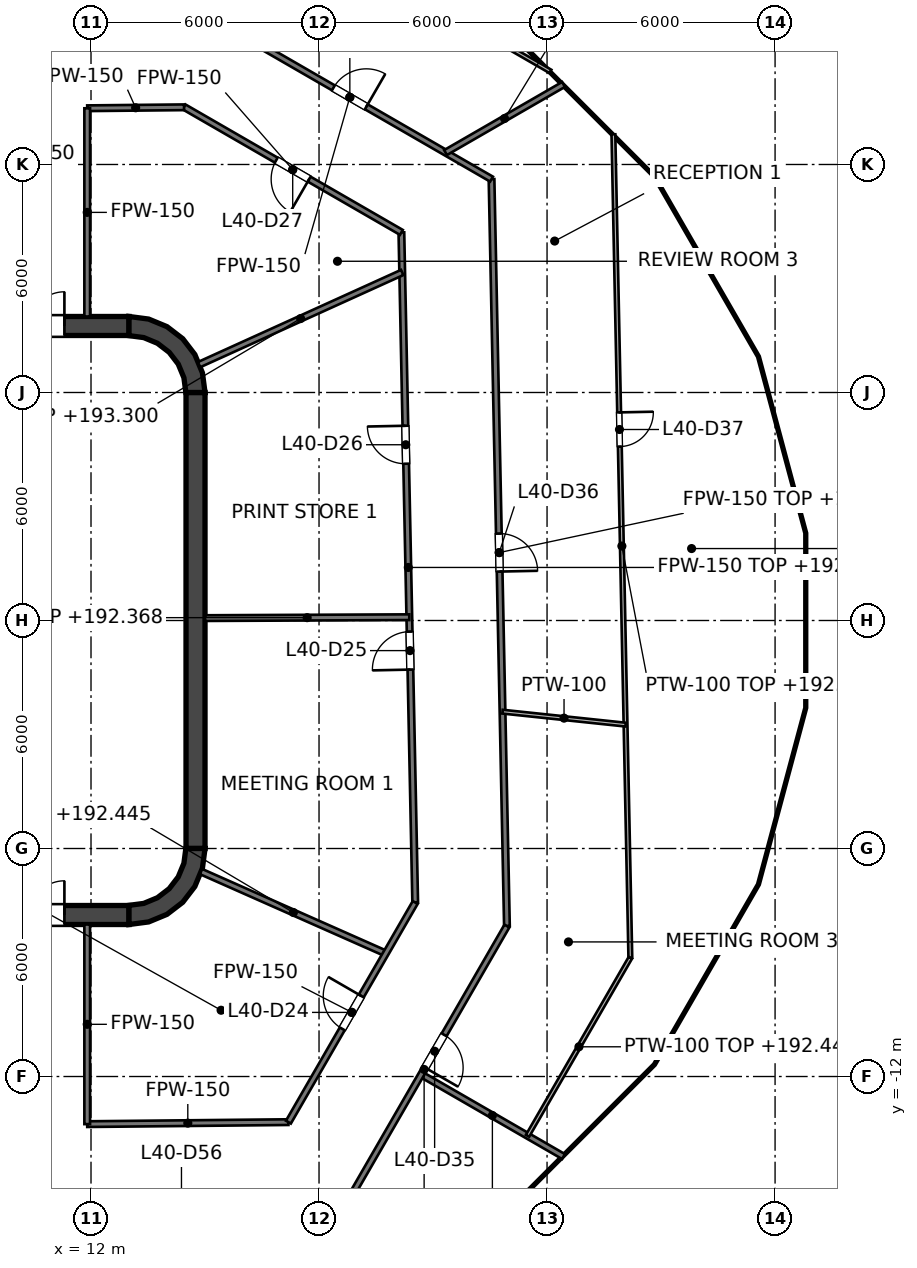
"""IFC4 building model, lengths in metres.
Left out: names, types, materials, properties, quantities, classifications, styles, units other than length and angle.
Written with IfcOpenShell. Run it as: python <this file> out.ifc"""

import sys

from ifc_helpers import new_model, si_unit, direction, frame, frame_2d, origin, place, context, subcontext, project, spatial, polyline, rectangle, outline, extrude, element, fill, save


model = new_model("IFC4")
c1 = context("Model", 3, precision=1e-05, world=origin(), true_north=direction((0.0, 1.0)))
c2 = subcontext(c1, "Body", "Model", "MODEL_VIEW")
j1 = project(units=[si_unit("LENGTHUNIT", "METRE"), si_unit("PLANEANGLEUNIT", "RADIAN")], contexts=[c1])
p1 = place(None, origin())
s1 = spatial("IfcSite", under=j1, at=p1, CompositionType="ELEMENT")
p2 = place(p1, origin())
s2 = spatial("IfcBuilding", under=s1, at=p2, CompositionType="ELEMENT")
p3 = place(p2, frame((0.0, 0.0, 189.6)))
s3 = spatial("IfcBuildingStorey", under=s2, at=p3, CompositionType="ELEMENT", Elevation=189.6)
p4 = place(p3, frame((-13.0, 7.75, 0.0), z_axis=(0.0, 0.0, 1.0), x_axis=(1.0, 0.0, 0.0)))
e1 = element("IfcWall", 1, at=p4, inside=s3, PredefinedType="SHEAR", context=c2, shape_type="SweptSolid", body=[
    extrude(rectangle(XDim=26.0, YDim=0.5, at=frame_2d((13.0, 0.0))), origin(), (0.0, 0.0, 1.0), 4.0),
])
p5 = place(p4, frame((1.7, 0.0, 0.0)))
e2 = element("IfcOpeningElement", 2, at=p5, cuts=e1, PredefinedType="OPENING", context=c2, shape_type="SweptSolid", body=[
    extrude(rectangle(XDim=1.8, YDim=2.1, at=frame_2d((0.9, 1.05))), frame((0.0, 0.25, 0.0), z_axis=(0.0, -1.0, 0.0), x_axis=(1.0, 0.0, 0.0)), (0.0, 0.0, 1.0), 0.5),
])
p6 = place(p4, frame((22.5, 0.0, 0.0)))
e3 = element("IfcOpeningElement", 3, at=p6, cuts=e1, PredefinedType="OPENING", context=c2, shape_type="SweptSolid", body=[
    extrude(rectangle(XDim=1.8, YDim=2.1, at=frame_2d((0.9, 1.05))), frame((0.0, 0.25, 0.0), z_axis=(0.0, -1.0, 0.0), x_axis=(1.0, 0.0, 0.0)), (0.0, 0.0, 1.0), 0.5),
])
p7 = place(p3, frame((-13.0, -7.75, 0.0), z_axis=(0.0, 0.0, 1.0), x_axis=(1.0, 0.0, 0.0)))
e4 = element("IfcWall", 4, at=p7, inside=s3, PredefinedType="SHEAR", context=c2, shape_type="SweptSolid", body=[
    extrude(rectangle(XDim=26.0, YDim=0.5, at=frame_2d((13.0, 0.0))), origin(), (0.0, 0.0, 1.0), 4.0),
])
p8 = place(p7, frame((1.7, 0.0, 0.0)))
e5 = element("IfcOpeningElement", 5, at=p8, cuts=e4, PredefinedType="OPENING", context=c2, shape_type="SweptSolid", body=[
    extrude(rectangle(XDim=1.8, YDim=2.1, at=frame_2d((0.9, 1.05))), frame((0.0, 0.25, 0.0), z_axis=(0.0, -1.0, 0.0), x_axis=(1.0, 0.0, 0.0)), (0.0, 0.0, 1.0), 0.5),
])
p9 = place(p7, frame((22.5, 0.0, 0.0)))
e6 = element("IfcOpeningElement", 6, at=p9, cuts=e4, PredefinedType="OPENING", context=c2, shape_type="SweptSolid", body=[
    extrude(rectangle(XDim=1.8, YDim=2.1, at=frame_2d((0.9, 1.05))), frame((0.0, 0.25, 0.0), z_axis=(0.0, -1.0, 0.0), x_axis=(1.0, 0.0, 0.0)), (0.0, 0.0, 1.0), 0.5),
])
p10 = place(p3, frame((14.75, -6.0, 0.0), z_axis=(0.0, 0.0, 1.0), x_axis=(0.0, 1.0, 0.0)))
e7 = element("IfcWall", 7, at=p10, inside=s3, PredefinedType="SHEAR", context=c2, shape_type="SweptSolid", body=[
    extrude(rectangle(XDim=12.0, YDim=0.5, at=frame_2d((6.0, 0.0))), origin(), (0.0, 0.0, 1.0), 4.0),
])
p11 = place(p3, origin())
e8 = element("IfcWall", 8, at=p11, inside=s3, PredefinedType="SHEAR", context=c2, shape_type="SweptSolid", body=[
    extrude(outline(polyline([(13.0, 8.0), (13.0, 7.496), (13.387, 7.445), (13.748, 7.295), (14.058, 7.058), (14.295, 6.748), (14.445, 6.387), (14.496, 6.0), (15.0, 6.0), (14.932, 6.518), (14.732, 7.0), (14.414, 7.414), (14.0, 7.732), (13.518, 7.932), (13.0, 8.0)])), origin(), (0.0, 0.0, 1.0), 4.0),
])
e9 = element("IfcWall", 9, at=p11, inside=s3, PredefinedType="SHEAR", context=c2, shape_type="SweptSolid", body=[
    extrude(outline(polyline([(15.0, -6.0), (14.496, -6.0), (14.445, -6.387), (14.295, -6.748), (14.058, -7.058), (13.748, -7.295), (13.387, -7.445), (13.0, -7.496), (13.0, -8.0), (13.518, -7.932), (14.0, -7.732), (14.414, -7.414), (14.732, -7.0), (14.932, -6.518), (15.0, -6.0)])), origin(), (0.0, 0.0, 1.0), 4.0),
])
p12 = place(p3, frame((11.8, -7.5, 0.0), z_axis=(0.0, 0.0, 1.0), x_axis=(0.0, 1.0, 0.0)))
e10 = element("IfcWall", 10, at=p12, inside=s3, PredefinedType="SOLIDWALL", context=c2, shape_type="SweptSolid", body=[
    extrude(rectangle(XDim=15.0, YDim=0.4, at=frame_2d((7.5, 0.0))), origin(), (0.0, 0.0, 1.0), 3.85),
])
p13 = place(p12, frame((11.3, 0.0, 0.0)))
e11 = element("IfcOpeningElement", 11, at=p13, cuts=e10, PredefinedType="OPENING", context=c2, shape_type="SweptSolid", body=[
    extrude(rectangle(XDim=1.1, YDim=2.1, at=frame_2d((0.55, 1.05))), frame((0.0, 0.2, 0.0), z_axis=(0.0, -1.0, 0.0), x_axis=(1.0, 0.0, 0.0)), (0.0, 0.0, 1.0), 0.4),
])
p14 = place(p12, frame((8.4, 0.0, 0.0)))
e12 = element("IfcOpeningElement", 12, at=p14, cuts=e10, PredefinedType="OPENING", context=c2, shape_type="SweptSolid", body=[
    extrude(rectangle(XDim=1.1, YDim=2.1, at=frame_2d((0.55, 1.05))), frame((0.0, 0.2, 0.0), z_axis=(0.0, -1.0, 0.0), x_axis=(1.0, 0.0, 0.0)), (0.0, 0.0, 1.0), 0.4),
])
p15 = place(p12, frame((5.5, 0.0, 0.0)))
e13 = element("IfcOpeningElement", 13, at=p15, cuts=e10, PredefinedType="OPENING", context=c2, shape_type="SweptSolid", body=[
    extrude(rectangle(XDim=1.1, YDim=2.1, at=frame_2d((0.55, 1.05))), frame((0.0, 0.2, 0.0), z_axis=(0.0, -1.0, 0.0), x_axis=(1.0, 0.0, 0.0)), (0.0, 0.0, 1.0), 0.4),
])
p16 = place(p12, frame((13.697, 0.0, 0.0)))
e14 = element("IfcOpeningElement", 14, at=p16, cuts=e10, PredefinedType="OPENING", context=c2, shape_type="SweptSolid", body=[
    extrude(rectangle(XDim=0.9, YDim=2.1, at=frame_2d((0.45, 1.05))), frame((0.0, 0.2, 0.0), z_axis=(0.0, -1.0, 0.0), x_axis=(1.0, 0.0, 0.0)), (0.0, 0.0, 1.0), 0.4),
])
p17 = place(p12, frame((0.403, 0.0, 0.0)))
e15 = element("IfcOpeningElement", 15, at=p17, cuts=e10, PredefinedType="OPENING", context=c2, shape_type="SweptSolid", body=[
    extrude(rectangle(XDim=0.9, YDim=2.1, at=frame_2d((0.45, 1.05))), frame((0.0, 0.2, 0.0), z_axis=(0.0, -1.0, 0.0), x_axis=(1.0, 0.0, 0.0)), (0.0, 0.0, 1.0), 0.4),
])
e16 = element("IfcWall", 16, at=p11, inside=s3, PredefinedType="SOLIDWALL", context=c2, shape_type="SweptSolid", body=[
    extrude(outline(polyline([(12.0, -5.675), (12.0, -5.925), (14.25, -5.925), (14.5, -5.925), (14.5, -5.675), (14.5, -3.025), (14.5, -2.775), (14.5, -0.125), (14.5, 0.125), (14.5, 2.775), (14.5, 3.025), (14.5, 5.675), (14.5, 5.925), (14.25, 5.925), (12.0, 5.925), (12.0, 5.675), (14.25, 5.675), (14.25, 3.025), (12.0, 3.025), (12.0, 2.775), (14.25, 2.775), (14.25, 0.125), (12.0, 0.125), (12.0, -0.125), (14.25, -0.125), (14.25, -2.775), (12.0, -2.775), (12.0, -3.025), (14.25, -3.025), (14.25, -5.675), (12.0, -5.675)])), origin(), (0.0, 0.0, 1.0), 3.85),
])
p18 = place(p3, frame((20.167, 10.213, 0.0), z_axis=(0.0, 0.0, 1.0), x_axis=(0.020624730832, -0.999787287616, 0.0)))
e17 = element("IfcWall", 17, at=p18, inside=s3, PredefinedType="PARTITIONING", context=c2, shape_type="SweptSolid", body=[
    extrude(rectangle(XDim=17.637, YDim=0.15, at=frame_2d((8.819, 0.0))), origin(), (0.0, 0.0, 1.0), 2.768),
])
p19 = place(p18, frame((10.508, 0.0, 0.0)))
e18 = element("IfcOpeningElement", 18, at=p19, cuts=e17, PredefinedType="OPENING", context=c2, shape_type="SweptSolid", body=[
    extrude(rectangle(XDim=1.0, YDim=2.1, at=frame_2d((0.5, 1.05))), frame((0.0, 0.075, 0.0), z_axis=(0.0, -1.0, 0.0), x_axis=(1.0, 0.0, 0.0)), (0.0, 0.0, 1.0), 0.15),
])
p20 = place(p18, frame((5.089, 0.0, 0.0)))
e19 = element("IfcOpeningElement", 19, at=p20, cuts=e17, PredefinedType="OPENING", context=c2, shape_type="SweptSolid", body=[
    extrude(rectangle(XDim=1.0, YDim=2.1, at=frame_2d((0.5, 1.05))), frame((0.0, 0.075, 0.0), z_axis=(0.0, -1.0, 0.0), x_axis=(1.0, 0.0, 0.0)), (0.0, 0.0, 1.0), 0.15),
])
p21 = place(p3, frame((22.539, 11.615, 0.0), z_axis=(0.0, 0.0, 1.0), x_axis=(0.020626332176, -0.99978725458, 0.0)))
e20 = element("IfcWall", 20, at=p21, inside=s3, PredefinedType="PARTITIONING", context=c2, shape_type="SweptSolid", body=[
    extrude(rectangle(XDim=19.66, YDim=0.15, at=frame_2d((9.83, 0.0))), origin(), (0.0, 0.0, 1.0), 2.768),
])
p22 = place(p21, frame((9.33, 0.0, 0.0)))
e21 = element("IfcOpeningElement", 21, at=p22, cuts=e20, PredefinedType="OPENING", context=c2, shape_type="SweptSolid", body=[
    extrude(rectangle(XDim=1.0, YDim=2.1, at=frame_2d((0.5, 1.05))), frame((0.0, 0.075, 0.0), z_axis=(0.0, -1.0, 0.0), x_axis=(1.0, 0.0, 0.0)), (0.0, 0.0, 1.0), 0.15),
])
p23 = place(p3, frame((20.69, -11.945, 0.0), z_axis=(0.0, 0.0, 1.0), x_axis=(0.866048255864, -0.499960416948, 0.0)))
e22 = element("IfcWall", 22, at=p23, inside=s3, PredefinedType="PARTITIONING", context=c2, shape_type="SweptSolid", body=[
    extrude(rectangle(XDim=4.322, YDim=0.15, at=frame_2d((2.161, 0.0))), origin(), (0.0, 0.0, 1.0), 2.845),
])
p24 = place(p3, frame((14.448, 13.515, 0.0), z_axis=(0.0, 0.0, 1.0), x_axis=(0.866032288321, -0.499988075443, 0.0)))
e23 = element("IfcWall", 23, at=p24, inside=s3, PredefinedType="PARTITIONING", context=c2, shape_type="SweptSolid", body=[
    extrude(rectangle(XDim=6.604, YDim=0.15, at=frame_2d((3.302, 0.0))), origin(), (0.0, 0.0, 1.0), 2.777),
])
p25 = place(p24, frame((2.802, 0.0, 0.0)))
e24 = element("IfcOpeningElement", 24, at=p25, cuts=e23, PredefinedType="OPENING", context=c2, shape_type="SweptSolid", body=[
    extrude(rectangle(XDim=1.0, YDim=2.1, at=frame_2d((0.5, 1.05))), frame((0.0, 0.075, 0.0), z_axis=(0.0, -1.0, 0.0), x_axis=(1.0, 0.0, 0.0)), (0.0, 0.0, 1.0), 0.15),
])
p26 = place(p3, frame((15.08, 15.921, 0.0), z_axis=(0.0, 0.0, 1.0), x_axis=(0.866020838546, -0.500007907142, 0.0)))
e25 = element("IfcWall", 25, at=p26, inside=s3, PredefinedType="PARTITIONING", context=c2, shape_type="SweptSolid", body=[
    extrude(rectangle(XDim=8.613, YDim=0.15, at=frame_2d((4.306, 0.0))), origin(), (0.0, 0.0, 1.0), 2.777),
])
p27 = place(p26, frame((3.808, 0.0, 0.0)))
e26 = element("IfcOpeningElement", 26, at=p27, cuts=e25, PredefinedType="OPENING", context=c2, shape_type="SweptSolid", body=[
    extrude(rectangle(XDim=1.0, YDim=2.1, at=frame_2d((0.5, 1.05))), frame((0.0, 0.075, 0.0), z_axis=(0.0, -1.0, 0.0), x_axis=(1.0, 0.0, 0.0)), (0.0, 0.0, 1.0), 0.15),
])
p28 = place(p3, frame((14.895, -6.607, 0.0), z_axis=(0.0, 0.0, 1.0), x_axis=(0.914233271379, -0.405188259337, 0.0)))
e27 = element("IfcWall", 27, at=p28, inside=s3, PredefinedType="PARTITIONING", context=c2, shape_type="SweptSolid", body=[
    extrude(rectangle(XDim=5.317, YDim=0.15, at=frame_2d((2.659, 0.0))), origin(), (0.0, 0.0, 1.0), 2.845),
])
p29 = place(p3, frame((15.0, 0.063, 0.0), z_axis=(0.0, 0.0, 1.0), x_axis=(0.999990294223, 0.004405843865, 0.0)))
e28 = element("IfcWall", 28, at=p29, inside=s3, PredefinedType="PARTITIONING", context=c2, shape_type="SweptSolid", body=[
    extrude(rectangle(XDim=5.375, YDim=0.15, at=frame_2d((2.688, 0.0))), origin(), (0.0, 0.0, 1.0), 2.768),
])
p30 = place(p3, frame((11.9, -13.253, 0.0), z_axis=(0.0, 0.0, 1.0), x_axis=(0.999951309192, 0.009868092237, 0.0)))
e29 = element("IfcWall", 29, at=p30, inside=s3, PredefinedType="PARTITIONING", context=c2, shape_type="SweptSolid", body=[
    extrude(rectangle(XDim=5.294, YDim=0.15, at=frame_2d((2.647, 0.0))), origin(), (0.0, 0.0, 1.0), 2.777),
])
p31 = place(p3, frame((11.9, 13.48, 0.0), z_axis=(0.0, 0.0, 1.0), x_axis=(0.999951307579, 0.009868255694, 0.0)))
e30 = element("IfcWall", 30, at=p31, inside=s3, PredefinedType="PARTITIONING", context=c2, shape_type="SweptSolid", body=[
    extrude(rectangle(XDim=2.548, YDim=0.15, at=frame_2d((1.274, 0.0))), origin(), (0.0, 0.0, 1.0), 2.777),
])
p32 = place(p3, frame((14.843, 6.733, 0.0), z_axis=(0.0, 0.0, 1.0), x_axis=(0.910628361306, 0.413226315214, 0.0)))
e31 = element("IfcWall", 31, at=p32, inside=s3, PredefinedType="PARTITIONING", context=c2, shape_type="SweptSolid", body=[
    extrude(rectangle(XDim=5.87, YDim=0.15, at=frame_2d((2.935, 0.0))), origin(), (0.0, 0.0, 1.0), 3.7),
])
p33 = place(p3, frame((21.329, 12.314, 0.0), z_axis=(0.0, 0.0, 1.0), x_axis=(0.866038125567, 0.499977964579, 0.0)))
e32 = element("IfcWall", 32, at=p33, inside=s3, PredefinedType="PARTITIONING", context=c2, shape_type="SweptSolid", body=[
    extrude(rectangle(XDim=3.584, YDim=0.15, at=frame_2d((1.792, 0.0))), origin(), (0.0, 0.0, 1.0), 2.845),
])
p34 = place(p3, frame((18.587, -15.587, 0.0), z_axis=(0.0, 0.0, 1.0), x_axis=(0.499960140076, 0.866048415699, 0.0)))
e33 = element("IfcWall", 33, at=p34, inside=s3, PredefinedType="PARTITIONING", context=c2, shape_type="SweptSolid", body=[
    extrude(rectangle(XDim=8.714, YDim=0.15, at=frame_2d((4.357, 0.0))), origin(), (0.0, 0.0, 1.0), 2.777),
])
p35 = place(p34, frame((4.41, 0.0, 0.0)))
e34 = element("IfcOpeningElement", 34, at=p35, cuts=e33, PredefinedType="OPENING", context=c2, shape_type="SweptSolid", body=[
    extrude(rectangle(XDim=1.0, YDim=2.1, at=frame_2d((0.5, 1.05))), frame((0.0, 0.075, 0.0), z_axis=(0.0, -1.0, 0.0), x_axis=(1.0, 0.0, 0.0)), (0.0, 0.0, 1.0), 0.15),
])
p36 = place(p3, frame((17.194, -13.201, 0.0), z_axis=(0.0, 0.0, 1.0), x_axis=(0.499955744085, 0.866050953441, 0.0)))
e35 = element("IfcWall", 35, at=p36, inside=s3, PredefinedType="PARTITIONING", context=c2, shape_type="SweptSolid", body=[
    extrude(rectangle(XDim=6.673, YDim=0.15, at=frame_2d((3.337, 0.0))), origin(), (0.0, 0.0, 1.0), 2.777),
])
p37 = place(p36, frame((2.835, 0.0, 0.0)))
e36 = element("IfcOpeningElement", 36, at=p37, cuts=e35, PredefinedType="OPENING", context=c2, shape_type="SweptSolid", body=[
    extrude(rectangle(XDim=1.0, YDim=2.1, at=frame_2d((0.5, 1.05))), frame((0.0, 0.075, 0.0), z_axis=(0.0, -1.0, 0.0), x_axis=(1.0, 0.0, 0.0)), (0.0, 0.0, 1.0), 0.15),
])
p38 = place(p3, frame((11.9, -13.253, 0.0), z_axis=(0.0, 0.0, 1.0), x_axis=(0.0, 1.0, 0.0)))
e37 = element("IfcWall", 37, at=p38, inside=s3, PredefinedType="PARTITIONING", context=c2, shape_type="SweptSolid", body=[
    extrude(rectangle(XDim=5.253, YDim=0.15, at=frame_2d((2.626, 0.0))), origin(), (0.0, 0.0, 1.0), 2.777),
])
p39 = place(p3, frame((11.9, 8.0, 0.0), z_axis=(0.0, 0.0, 1.0), x_axis=(0.0, 1.0, 0.0)))
e38 = element("IfcWall", 38, at=p39, inside=s3, PredefinedType="PARTITIONING", context=c2, shape_type="SweptSolid", body=[
    extrude(rectangle(XDim=5.479, YDim=0.15, at=frame_2d((2.74, 0.0))), origin(), (0.0, 0.0, 1.0), 2.777),
])
p40 = place(p3, frame((25.746, 12.794, 0.0), z_axis=(0.0, 0.0, 1.0), x_axis=(0.020556718749, -0.999788688331, 0.0)))
e39 = element("IfcWall", 39, at=p40, inside=s3, PredefinedType="PARTITIONING", context=c2, shape_type="SweptSolid", body=[
    extrude(rectangle(XDim=21.675, YDim=0.1, at=frame_2d((10.837, 0.0))), origin(), (0.0, 0.0, 1.0), 2.768),
])
p41 = place(p40, frame((7.32, 0.0, 0.0)))
e40 = element("IfcOpeningElement", 40, at=p41, cuts=e39, PredefinedType="OPENING", context=c2, shape_type="SweptSolid", body=[
    extrude(rectangle(XDim=0.9, YDim=2.1, at=frame_2d((0.45, 1.05))), frame((0.0, 0.05, 0.0), z_axis=(0.0, -1.0, 0.0), x_axis=(1.0, 0.0, 0.0)), (0.0, 0.0, 1.0), 0.1),
])
p42 = place(p3, frame((15.931, 19.16, 0.0), z_axis=(0.0, 0.0, 1.0), x_axis=(0.86598056092, -0.500077662076, 0.0)))
e41 = element("IfcWall", 41, at=p42, inside=s3, PredefinedType="PARTITIONING", context=c2, shape_type="SweptSolid", body=[
    extrude(rectangle(XDim=9.42, YDim=0.1, at=frame_2d((4.71, 0.0))), origin(), (0.0, 0.0, 1.0), 2.777),
])
p43 = place(p3, frame((22.828, -2.399, 0.0), z_axis=(0.0, 0.0, 1.0), x_axis=(0.994498465997, -0.104751139033, 0.0)))
e42 = element("IfcWall", 42, at=p43, inside=s3, PredefinedType="PARTITIONING", context=c2, shape_type="SweptSolid", body=[
    extrude(rectangle(XDim=3.256, YDim=0.1, at=frame_2d((1.628, 0.0))), origin(), (0.0, 0.0, 1.0), 3.7),
])
p44 = place(p3, frame((23.487, -13.56, 0.0), z_axis=(0.0, 0.0, 1.0), x_axis=(0.500066272392, 0.86598713802, 0.0)))
e43 = element("IfcWall", 43, at=p44, inside=s3, PredefinedType="PARTITIONING", context=c2, shape_type="SweptSolid", body=[
    extrude(rectangle(XDim=5.409, YDim=0.1, at=frame_2d((2.705, 0.0))), origin(), (0.0, 0.0, 1.0), 2.845),
])
p45 = place(p13, origin())
e44 = element("IfcDoor", 44, at=p45, inside=s3, OperationType="DOUBLE_DOOR_SLIDING", PredefinedType="DOOR", context=c2, shape_type="SweptSolid", body=[
    extrude(rectangle(XDim=1.1, YDim=2.1, at=frame_2d((0.55, 1.05))), frame((0.0, 0.025, 0.0), z_axis=(0.0, -1.0, 0.0), x_axis=(1.0, 0.0, 0.0)), (0.0, 0.0, 1.0), 0.05),
])
fill(e11, e44)
p46 = place(p14, origin())
e45 = element("IfcDoor", 45, at=p46, inside=s3, OperationType="DOUBLE_DOOR_SLIDING", PredefinedType="DOOR", context=c2, shape_type="SweptSolid", body=[
    extrude(rectangle(XDim=1.1, YDim=2.1, at=frame_2d((0.55, 1.05))), frame((0.0, 0.025, 0.0), z_axis=(0.0, -1.0, 0.0), x_axis=(1.0, 0.0, 0.0)), (0.0, 0.0, 1.0), 0.05),
])
fill(e12, e45)
p47 = place(p15, origin())
e46 = element("IfcDoor", 46, at=p47, inside=s3, OperationType="DOUBLE_DOOR_SLIDING", PredefinedType="DOOR", context=c2, shape_type="SweptSolid", body=[
    extrude(rectangle(XDim=1.1, YDim=2.1, at=frame_2d((0.55, 1.05))), frame((0.0, 0.025, 0.0), z_axis=(0.0, -1.0, 0.0), x_axis=(1.0, 0.0, 0.0)), (0.0, 0.0, 1.0), 0.05),
])
fill(e13, e46)
p48 = place(p16, origin())
e47 = element("IfcDoor", 47, at=p48, inside=s3, OperationType="SINGLE_SWING_RIGHT", PredefinedType="DOOR", context=c2, shape_type="SweptSolid", body=[
    extrude(rectangle(XDim=0.9, YDim=2.1, at=frame_2d((0.45, 1.05))), frame((0.0, 0.025, 0.0), z_axis=(0.0, -1.0, 0.0), x_axis=(1.0, 0.0, 0.0)), (0.0, 0.0, 1.0), 0.05),
])
fill(e14, e47)
p49 = place(p17, origin())
e48 = element("IfcDoor", 48, at=p49, inside=s3, OperationType="SINGLE_SWING_RIGHT", PredefinedType="DOOR", context=c2, shape_type="SweptSolid", body=[
    extrude(rectangle(XDim=0.9, YDim=2.1, at=frame_2d((0.45, 1.05))), frame((0.0, 0.025, 0.0), z_axis=(0.0, -1.0, 0.0), x_axis=(1.0, 0.0, 0.0)), (0.0, 0.0, 1.0), 0.05),
])
fill(e15, e48)
p50 = place(p6, origin())
e49 = element("IfcDoor", 49, at=p50, inside=s3, OperationType="DOUBLE_DOOR_SINGLE_SWING", PredefinedType="DOOR", context=c2, shape_type="SweptSolid", body=[
    extrude(rectangle(XDim=1.8, YDim=2.1, at=frame_2d((0.9, 1.05))), frame((0.0, 0.025, 0.0), z_axis=(0.0, -1.0, 0.0), x_axis=(1.0, 0.0, 0.0)), (0.0, 0.0, 1.0), 0.05),
])
fill(e3, e49)
p51 = place(p9, origin())
e50 = element("IfcDoor", 50, at=p51, inside=s3, OperationType="DOUBLE_DOOR_SINGLE_SWING", PredefinedType="DOOR", context=c2, shape_type="SweptSolid", body=[
    extrude(rectangle(XDim=1.8, YDim=2.1, at=frame_2d((0.9, 1.05))), frame((0.0, 0.025, 0.0), z_axis=(0.0, -1.0, 0.0), x_axis=(1.0, 0.0, 0.0)), (0.0, 0.0, 1.0), 0.05),
])
fill(e6, e50)
p52 = place(p37, origin())
e51 = element("IfcDoor", 51, at=p52, inside=s3, OperationType="SINGLE_SWING_RIGHT", PredefinedType="DOOR", context=c2, shape_type="SweptSolid", body=[
    extrude(rectangle(XDim=1.0, YDim=2.1, at=frame_2d((0.5, 1.05))), frame((0.0, 0.025, 0.0), z_axis=(0.0, -1.0, 0.0), x_axis=(1.0, 0.0, 0.0)), (0.0, 0.0, 1.0), 0.05),
])
fill(e36, e51)
p53 = place(p19, origin())
e52 = element("IfcDoor", 52, at=p53, inside=s3, OperationType="SINGLE_SWING_RIGHT", PredefinedType="DOOR", context=c2, shape_type="SweptSolid", body=[
    extrude(rectangle(XDim=1.0, YDim=2.1, at=frame_2d((0.5, 1.05))), frame((0.0, 0.025, 0.0), z_axis=(0.0, -1.0, 0.0), x_axis=(1.0, 0.0, 0.0)), (0.0, 0.0, 1.0), 0.05),
])
fill(e18, e52)
p54 = place(p20, origin())
e53 = element("IfcDoor", 53, at=p54, inside=s3, OperationType="SINGLE_SWING_LEFT", PredefinedType="DOOR", context=c2, shape_type="SweptSolid", body=[
    extrude(rectangle(XDim=1.0, YDim=2.1, at=frame_2d((0.5, 1.05))), frame((0.0, 0.025, 0.0), z_axis=(0.0, -1.0, 0.0), x_axis=(1.0, 0.0, 0.0)), (0.0, 0.0, 1.0), 0.05),
])
fill(e19, e53)
p55 = place(p25, origin())
e54 = element("IfcDoor", 54, at=p55, inside=s3, OperationType="SINGLE_SWING_RIGHT", PredefinedType="DOOR", context=c2, shape_type="SweptSolid", body=[
    extrude(rectangle(XDim=1.0, YDim=2.1, at=frame_2d((0.5, 1.05))), frame((0.0, 0.025, 0.0), z_axis=(0.0, -1.0, 0.0), x_axis=(1.0, 0.0, 0.0)), (0.0, 0.0, 1.0), 0.05),
])
fill(e24, e54)
p56 = place(p35, origin())
e55 = element("IfcDoor", 55, at=p56, inside=s3, OperationType="SINGLE_SWING_LEFT", PredefinedType="DOOR", context=c2, shape_type="SweptSolid", body=[
    extrude(rectangle(XDim=1.0, YDim=2.1, at=frame_2d((0.5, 1.05))), frame((0.0, 0.025, 0.0), z_axis=(0.0, -1.0, 0.0), x_axis=(1.0, 0.0, 0.0)), (0.0, 0.0, 1.0), 0.05),
])
fill(e34, e55)
p57 = place(p22, origin())
e56 = element("IfcDoor", 56, at=p57, inside=s3, OperationType="SINGLE_SWING_RIGHT", PredefinedType="DOOR", context=c2, shape_type="SweptSolid", body=[
    extrude(rectangle(XDim=1.0, YDim=2.1, at=frame_2d((0.5, 1.05))), frame((0.0, 0.025, 0.0), z_axis=(0.0, -1.0, 0.0), x_axis=(1.0, 0.0, 0.0)), (0.0, 0.0, 1.0), 0.05),
])
fill(e21, e56)
p58 = place(p41, origin())
e57 = element("IfcDoor", 57, at=p58, inside=s3, OperationType="SINGLE_SWING_LEFT", PredefinedType="DOOR", context=c2, shape_type="SweptSolid", body=[
    extrude(rectangle(XDim=0.9, YDim=2.1, at=frame_2d((0.45, 1.05))), frame((0.0, 0.025, 0.0), z_axis=(0.0, -1.0, 0.0), x_axis=(1.0, 0.0, 0.0)), (0.0, 0.0, 1.0), 0.05),
])
fill(e40, e57)
p59 = place(p27, origin())
e58 = element("IfcDoor", 58, at=p59, inside=s3, OperationType="SINGLE_SWING_RIGHT", PredefinedType="DOOR", context=c2, shape_type="SweptSolid", body=[
    extrude(rectangle(XDim=1.0, YDim=2.1, at=frame_2d((0.5, 1.05))), frame((0.0, 0.025, 0.0), z_axis=(0.0, -1.0, 0.0), x_axis=(1.0, 0.0, 0.0)), (0.0, 0.0, 1.0), 0.05),
])
fill(e26, e58)
save(model, sys.argv[1])
